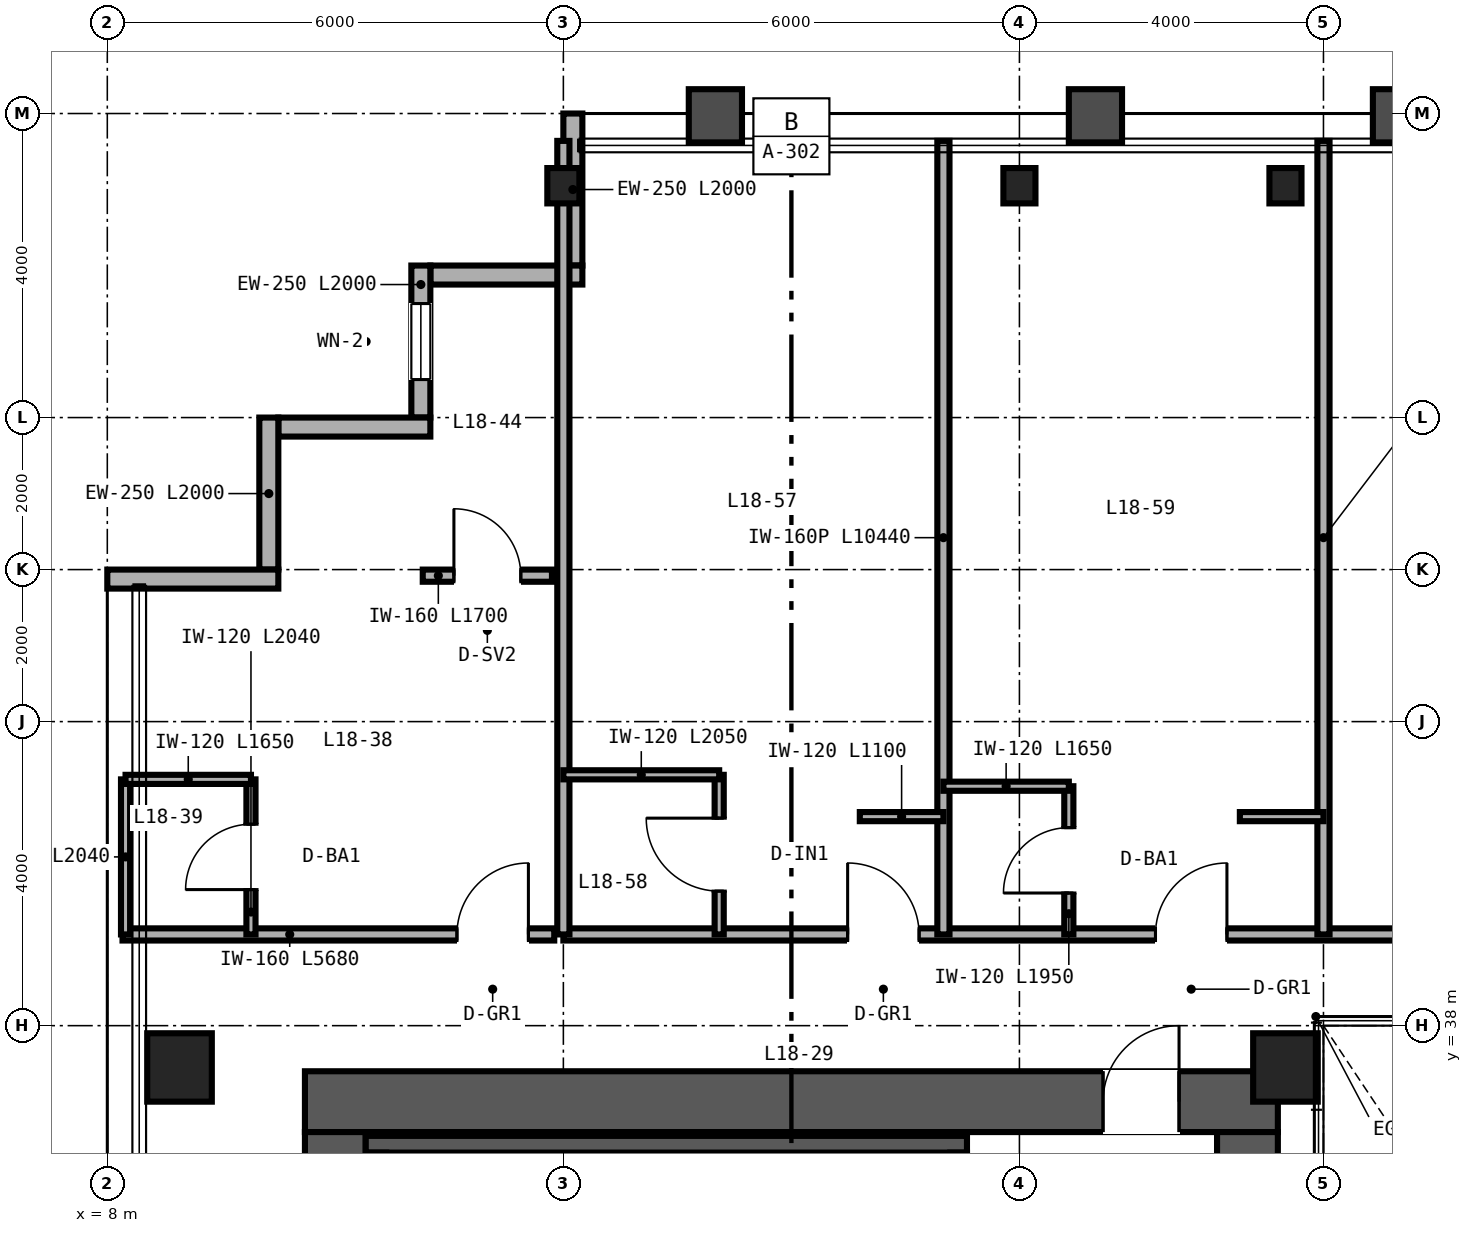
"""IFC4 building model, lengths in metres.
Left out: names, types, materials, properties, quantities, classifications, styles, units other than length and angle.
Written with IfcOpenShell. Run it as: python <this file> out.ifc"""

import sys

from ifc_helpers import new_model, si_unit, direction, frame, frame_2d, origin, origin_2d, place, context, subcontext, project, spatial, rectangle, hollow_rectangle, i_section, extrude, source, transform, mapped, element, fill, save


model = new_model("IFC4")
c1 = context("Model", 3, precision=1e-05, world=origin(), true_north=direction((0.0, 1.0)))
c2 = subcontext(c1, "Body", "Model", "MODEL_VIEW")
j1 = project(units=[si_unit("LENGTHUNIT", "METRE"), si_unit("PLANEANGLEUNIT", "RADIAN")], contexts=[c1])
p1 = place(None, origin())
s1 = spatial("IfcSite", under=j1, at=p1, CompositionType="ELEMENT")
p2 = place(p1, origin())
s2 = spatial("IfcBuilding", under=s1, at=p2, CompositionType="ELEMENT")
p3 = place(p2, frame((0.0, 0.0, 74.4)))
s3 = spatial("IfcBuildingStorey", under=s2, at=p3, CompositionType="ELEMENT", Elevation=74.4)
p4 = place(p3, frame((10.6, 37.0, 0.0), z_axis=(0.0, 0.0, 1.0), x_axis=(1.0, 0.0, 0.0)))
e1 = element("IfcWall", 1, at=p4, inside=s3, PredefinedType="SHEAR", context=c2, shape_type="SweptSolid", body=[
    extrude(rectangle(XDim=12.8, YDim=0.8, at=frame_2d((6.4, 0.0))), origin(), (0.0, 0.0, 1.0), 3.35),
])
p5 = place(p4, frame((10.5, 0.0, 0.0)))
e2 = element("IfcOpeningElement", 2, at=p5, cuts=e1, PredefinedType="OPENING", context=c2, shape_type="SweptSolid", body=[
    extrude(rectangle(XDim=1.0, YDim=2.15, at=frame_2d((0.5, 1.075))), frame((0.0, 0.41, 0.0), z_axis=(0.0, -1.0, 0.0), x_axis=(1.0, 0.0, 0.0)), (0.0, 0.0, 1.0), 0.82),
])
for number, where, z_axis, x_axis in (
    (3, (11.0, 15.4, 0.0), (0.0, 0.0, 1.0), (0.0, 1.0, 0.0)),
    (4, (23.0, 15.4, 0.0), (0.0, 0.0, 1.0), (0.0, 1.0, 0.0)),
):
    element("IfcWall", number, at=place(p3, frame(where, z_axis=z_axis, x_axis=x_axis)), inside=s3, PredefinedType="SHEAR", context=c2, shape_type="SweptSolid", body=[
        extrude(rectangle(XDim=21.2, YDim=0.8, at=frame_2d((10.6, 0.0))), origin(), (0.0, 0.0, 1.0), 3.35),
    ])
p6 = place(p3, frame((11.4, 36.44, 0.0), z_axis=(0.0, 0.0, 1.0), x_axis=(1.0, 0.0, 0.0)))
e5 = element("IfcWall", 5, at=p6, inside=s3, PredefinedType="SHEAR", context=c2, shape_type="SweptSolid", body=[
    extrude(rectangle(XDim=7.91, YDim=0.22, at=frame_2d((3.955, 0.0))), origin(), (0.0, 0.0, 1.0), 3.4),
])
for number, where, z_axis, x_axis in (
    (6, (11.56, 33.05, 0.0), (0.0, 0.0, 1.0), (0.0, 1.0, 0.0)),
    (7, (19.2, 33.05, 0.0), (0.0, 0.0, 1.0), (0.0, 1.0, 0.0)),
):
    element("IfcWall", number, at=place(p3, frame(where, z_axis=z_axis, x_axis=x_axis)), inside=s3, PredefinedType="SHEAR", context=c2, shape_type="SweptSolid", body=[
        extrude(rectangle(XDim=3.28, YDim=0.22, at=frame_2d((1.64, 0.0))), origin(), (0.0, 0.0, 1.0), 3.4),
    ])
m1 = source(origin(), c2, "Body", "SweptSolid", [
    extrude(hollow_rectangle(XDim=0.85, YDim=0.9, WallThickness=0.04, at=origin_2d()), origin(), (0.0, 0.0, 1.0), 3.35),
])
for number, where, z_axis, x_axis in (
    (8, (8.95, 37.45, 0.0), (0.0, 0.0, 1.0), (1.0, 0.0, 0.0)),
    (9, (23.5, 37.45, 0.0), (0.0, 0.0, 1.0), (1.0, 0.0, 0.0)),
):
    element("IfcColumn", number, at=place(p3, frame(where, z_axis=z_axis, x_axis=x_axis)), inside=s3, PredefinedType="COLUMN", context=c2, shape_type="MappedRepresentation", body=[
        mapped(m1, transform((0.0, 0.0, 0.0), scale=1.0)),
    ])
m2 = source(origin(), c2, "Body", "SweptSolid", [
    extrude(i_section(OverallWidth=0.422, OverallDepth=0.465, WebThickness=0.045, FlangeThickness=0.073, FilletRadius=0.025, at=origin_2d()), origin(), (0.0, 0.0, 1.0), 3.35),
])
for number, where, z_axis, x_axis in (
    (10, (14.0, 49.05, 0.0), (0.0, 0.0, 1.0), (1.0, 0.0, 0.0)),
    (11, (20.0, 49.05, 0.0), (0.0, 0.0, 1.0), (1.0, 0.0, 0.0)),
    (12, (23.5, 49.05, 0.0), (0.0, 0.0, 1.0), (1.0, 0.0, 0.0)),
):
    element("IfcColumn", number, at=place(p3, frame(where, z_axis=z_axis, x_axis=x_axis)), inside=s3, PredefinedType="COLUMN", context=c2, shape_type="MappedRepresentation", body=[
        mapped(m2, transform((0.0, 0.0, 0.0), scale=1.0)),
    ])
p7 = place(p3, frame((14.125, 50.0, 0.0), z_axis=(0.0, 0.0, 1.0), x_axis=(0.0, -1.0, 0.0)))
e13 = element("IfcWall", 13, at=p7, inside=s3, PredefinedType="SOLIDWALL", context=c2, shape_type="SweptSolid", body=[
    extrude(rectangle(XDim=2.0, YDim=0.25, at=frame_2d((1.0, 0.0))), origin(), (0.0, 0.0, 1.0), 2.657),
])
p8 = place(p3, frame((14.25, 47.875, 0.0), z_axis=(0.0, 0.0, 1.0), x_axis=(-1.0, 0.0, 0.0)))
e14 = element("IfcWall", 14, at=p8, inside=s3, PredefinedType="SOLIDWALL", context=c2, shape_type="SweptSolid", body=[
    extrude(rectangle(XDim=2.0, YDim=0.25, at=frame_2d((1.0, 0.0))), origin(), (0.0, 0.0, 1.0), 3.35),
])
p9 = place(p3, frame((12.125, 48.0, 0.0), z_axis=(0.0, 0.0, 1.0), x_axis=(0.0, -1.0, 0.0)))
e15 = element("IfcWall", 15, at=p9, inside=s3, PredefinedType="SOLIDWALL", context=c2, shape_type="SweptSolid", body=[
    extrude(rectangle(XDim=2.0, YDim=0.25, at=frame_2d((1.0, 0.0))), origin(), (0.0, 0.0, 1.0), 3.35),
])
p10 = place(p9, frame((0.5, 0.0, 0.85)))
e16 = element("IfcOpeningElement", 16, at=p10, cuts=e15, PredefinedType="OPENING", context=c2, shape_type="SweptSolid", body=[
    extrude(rectangle(XDim=1.0, YDim=1.9, at=frame_2d((0.5, 0.95))), frame((0.0, 0.135, 0.0), z_axis=(0.0, -1.0, 0.0), x_axis=(1.0, 0.0, 0.0)), (0.0, 0.0, 1.0), 0.27),
])
for number, where, z_axis, x_axis in (
    (17, (12.25, 45.875, 0.0), (0.0, 0.0, 1.0), (-1.0, 0.0, 0.0)),
    (18, (10.125, 46.0, 0.0), (0.0, 0.0, 1.0), (0.0, -1.0, 0.0)),
):
    element("IfcWall", number, at=place(p3, frame(where, z_axis=z_axis, x_axis=x_axis)), inside=s3, PredefinedType="SOLIDWALL", context=c2, shape_type="SweptSolid", body=[
        extrude(rectangle(XDim=2.0, YDim=0.25, at=frame_2d((1.0, 0.0))), origin(), (0.0, 0.0, 1.0), 3.35),
    ])
p11 = place(p3, frame((10.25, 43.875, 0.0), z_axis=(0.0, 0.0, 1.0), x_axis=(-1.0, 0.0, 0.0)))
e19 = element("IfcWall", 19, at=p11, inside=s3, PredefinedType="SOLIDWALL", context=c2, shape_type="SweptSolid", body=[
    extrude(rectangle(XDim=2.25, YDim=0.25, at=frame_2d((1.125, 0.0))), origin(), (0.0, 0.0, 1.0), 3.35),
])
p12 = place(p3, frame((8.2, 39.2, 0.0), z_axis=(0.0, 0.0, 1.0), x_axis=(1.0, 0.0, 0.0)))
e20 = element("IfcWall", 20, at=p12, inside=s3, PredefinedType="PARTITIONING", context=c2, shape_type="SweptSolid", body=[
    extrude(rectangle(XDim=5.68, YDim=0.16, at=frame_2d((2.84, 0.0))), origin(), (0.0, 0.0, 1.0), 3.35),
])
p13 = place(p12, frame((4.4, 0.0, 0.0)))
e21 = element("IfcOpeningElement", 21, at=p13, cuts=e20, PredefinedType="OPENING", context=c2, shape_type="SweptSolid", body=[
    extrude(rectangle(XDim=0.94, YDim=2.15, at=frame_2d((0.47, 1.075))), frame((0.0, 0.09, 0.0), z_axis=(0.0, -1.0, 0.0), x_axis=(1.0, 0.0, 0.0)), (0.0, 0.0, 1.0), 0.18),
])
p14 = place(p3, frame((9.89, 39.2, 0.0), z_axis=(0.0, 0.0, 1.0), x_axis=(0.0, 1.0, 0.0)))
e22 = element("IfcWall", 22, at=p14, inside=s3, PredefinedType="PARTITIONING", context=c2, shape_type="SweptSolid", body=[
    extrude(rectangle(XDim=2.04, YDim=0.12, at=frame_2d((1.02, 0.0))), origin(), (0.0, 0.0, 1.0), 3.35),
])
p15 = place(p14, frame((0.59, 0.0, 0.0)))
e23 = element("IfcOpeningElement", 23, at=p15, cuts=e22, PredefinedType="OPENING", context=c2, shape_type="SweptSolid", body=[
    extrude(rectangle(XDim=0.86, YDim=2.1, at=frame_2d((0.43, 1.05))), frame((0.0, 0.07, 0.0), z_axis=(0.0, -1.0, 0.0), x_axis=(1.0, 0.0, 0.0)), (0.0, 0.0, 1.0), 0.14),
])
p16 = place(p3, frame((8.24, 39.2, 0.0), z_axis=(0.0, 0.0, 1.0), x_axis=(0.0, 1.0, 0.0)))
e24 = element("IfcWall", 24, at=p16, inside=s3, PredefinedType="PARTITIONING", context=c2, shape_type="SweptSolid", body=[
    extrude(rectangle(XDim=2.04, YDim=0.12, at=frame_2d((1.02, 0.0))), origin(), (0.0, 0.0, 1.0), 3.35),
])
p17 = place(p3, frame((8.24, 41.24, 0.0), z_axis=(0.0, 0.0, 1.0), x_axis=(1.0, 0.0, 0.0)))
e25 = element("IfcWall", 25, at=p17, inside=s3, PredefinedType="PARTITIONING", context=c2, shape_type="SweptSolid", body=[
    extrude(rectangle(XDim=1.65, YDim=0.12, at=frame_2d((0.825, 0.0))), origin(), (0.0, 0.0, 1.0), 3.35),
])
p18 = place(p3, frame((12.15, 43.92, 0.0), z_axis=(0.0, 0.0, 1.0), x_axis=(1.0, 0.0, 0.0)))
e26 = element("IfcWall", 26, at=p18, inside=s3, PredefinedType="PARTITIONING", context=c2, shape_type="SweptSolid", body=[
    extrude(rectangle(XDim=1.7, YDim=0.16, at=frame_2d((0.85, 0.0))), origin(), (0.0, 0.0, 1.0), 3.35),
])
p19 = place(p18, frame((0.41, 0.0, 0.0)))
e27 = element("IfcOpeningElement", 27, at=p19, cuts=e26, PredefinedType="OPENING", context=c2, shape_type="SweptSolid", body=[
    extrude(rectangle(XDim=0.88, YDim=2.15, at=frame_2d((0.44, 1.075))), frame((0.0, 0.09, 0.0), z_axis=(0.0, -1.0, 0.0), x_axis=(1.0, 0.0, 0.0)), (0.0, 0.0, 1.0), 0.18),
])
p20 = place(p3, frame((14.0, 39.2, 0.0), z_axis=(0.0, 0.0, 1.0), x_axis=(1.0, 0.0, 0.0)))
e28 = element("IfcWall", 28, at=p20, inside=s3, PredefinedType="PARTITIONING", context=c2, shape_type="SweptSolid", body=[
    extrude(rectangle(XDim=36.0, YDim=0.16, at=frame_2d((18.0, 0.0))), origin(), (0.0, 0.0, 1.0), 2.571),
])
p21 = place(p20, frame((3.74, 0.0, 0.0)))
e29 = element("IfcOpeningElement", 29, at=p21, cuts=e28, PredefinedType="OPENING", context=c2, shape_type="SweptSolid", body=[
    extrude(rectangle(XDim=0.94, YDim=2.15, at=frame_2d((0.47, 1.075))), frame((0.0, 0.09, 0.0), z_axis=(0.0, -1.0, 0.0), x_axis=(1.0, 0.0, 0.0)), (0.0, 0.0, 1.0), 0.18),
])
p22 = place(p20, frame((7.79, 0.0, 0.0)))
e30 = element("IfcOpeningElement", 30, at=p22, cuts=e28, PredefinedType="OPENING", context=c2, shape_type="SweptSolid", body=[
    extrude(rectangle(XDim=0.94, YDim=2.15, at=frame_2d((0.47, 1.075))), frame((0.0, 0.09, 0.0), z_axis=(0.0, -1.0, 0.0), x_axis=(1.0, 0.0, 0.0)), (0.0, 0.0, 1.0), 0.18),
])
p23 = place(p20, frame((12.22, 0.0, 0.0)))
e31 = element("IfcOpeningElement", 31, at=p23, cuts=e28, PredefinedType="OPENING", context=c2, shape_type="SweptSolid", body=[
    extrude(rectangle(XDim=0.96, YDim=2.15, at=frame_2d((0.48, 1.075))), frame((0.0, 0.09, 0.0), z_axis=(0.0, -1.0, 0.0), x_axis=(1.0, 0.0, 0.0)), (0.0, 0.0, 1.0), 0.18),
])
p24 = place(p20, frame((19.94, 0.0, 0.0)))
e32 = element("IfcOpeningElement", 32, at=p24, cuts=e28, PredefinedType="OPENING", context=c2, shape_type="SweptSolid", body=[
    extrude(rectangle(XDim=0.94, YDim=2.15, at=frame_2d((0.47, 1.075))), frame((0.0, 0.09, 0.0), z_axis=(0.0, -1.0, 0.0), x_axis=(1.0, 0.0, 0.0)), (0.0, 0.0, 1.0), 0.18),
])
p25 = place(p20, frame((24.84, 0.0, 0.0)))
e33 = element("IfcOpeningElement", 33, at=p25, cuts=e28, PredefinedType="OPENING", context=c2, shape_type="SweptSolid", body=[
    extrude(rectangle(XDim=0.94, YDim=2.15, at=frame_2d((0.47, 1.075))), frame((0.0, 0.09, 0.0), z_axis=(0.0, -1.0, 0.0), x_axis=(1.0, 0.0, 0.0)), (0.0, 0.0, 1.0), 0.18),
])
p26 = place(p20, frame((29.94, 0.0, 0.0)))
e34 = element("IfcOpeningElement", 34, at=p26, cuts=e28, PredefinedType="OPENING", context=c2, shape_type="SweptSolid", body=[
    extrude(rectangle(XDim=0.94, YDim=2.15, at=frame_2d((0.47, 1.075))), frame((0.0, 0.09, 0.0), z_axis=(0.0, -1.0, 0.0), x_axis=(1.0, 0.0, 0.0)), (0.0, 0.0, 1.0), 0.18),
])
p27 = place(p20, frame((33.12, 0.0, 0.0)))
e35 = element("IfcOpeningElement", 35, at=p27, cuts=e28, PredefinedType="OPENING", context=c2, shape_type="SweptSolid", body=[
    extrude(rectangle(XDim=0.96, YDim=2.15, at=frame_2d((0.48, 1.075))), frame((0.0, 0.09, 0.0), z_axis=(0.0, -1.0, 0.0), x_axis=(1.0, 0.0, 0.0)), (0.0, 0.0, 1.0), 0.18),
])
for number, where, z_axis, x_axis in (
    (36, (14.0, 39.2, 0.0), (0.0, 0.0, 1.0), (0.0, 1.0, 0.0)),
    (37, (19.0, 39.2, 0.0), (0.0, 0.0, 1.0), (0.0, 1.0, 0.0)),
):
    element("IfcWall", number, at=place(p3, frame(where, z_axis=z_axis, x_axis=x_axis)), inside=s3, PredefinedType="PARTITIONING", context=c2, shape_type="SweptSolid", body=[
        extrude(rectangle(XDim=10.44, YDim=0.16, at=frame_2d((5.22, 0.0))), origin(), (0.0, 0.0, 1.0), 2.657),
    ])
p28 = place(p3, frame((16.05, 39.2, 0.0), z_axis=(0.0, 0.0, 1.0), x_axis=(0.0, 1.0, 0.0)))
e38 = element("IfcWall", 38, at=p28, inside=s3, PredefinedType="PARTITIONING", context=c2, shape_type="SweptSolid", body=[
    extrude(rectangle(XDim=2.1, YDim=0.12, at=frame_2d((1.05, 0.0))), origin(), (0.0, 0.0, 1.0), 3.35),
])
p29 = place(p28, frame((0.57, 0.0, 0.0)))
e39 = element("IfcOpeningElement", 39, at=p29, cuts=e38, PredefinedType="OPENING", context=c2, shape_type="SweptSolid", body=[
    extrude(rectangle(XDim=0.96, YDim=2.15, at=frame_2d((0.48, 1.075))), frame((0.0, 0.07, 0.0), z_axis=(0.0, -1.0, 0.0), x_axis=(1.0, 0.0, 0.0)), (0.0, 0.0, 1.0), 0.14),
])
p30 = place(p3, frame((14.0, 41.3, 0.0), z_axis=(0.0, 0.0, 1.0), x_axis=(1.0, 0.0, 0.0)))
e40 = element("IfcWall", 40, at=p30, inside=s3, PredefinedType="PARTITIONING", context=c2, shape_type="SweptSolid", body=[
    extrude(rectangle(XDim=2.05, YDim=0.12, at=frame_2d((1.025, 0.0))), origin(), (0.0, 0.0, 1.0), 3.35),
])
p31 = place(p3, frame((17.9, 40.75, 0.0), z_axis=(0.0, 0.0, 1.0), x_axis=(1.0, 0.0, 0.0)))
e41 = element("IfcWall", 41, at=p31, inside=s3, PredefinedType="PARTITIONING", context=c2, shape_type="SweptSolid", body=[
    extrude(rectangle(XDim=1.1, YDim=0.12, at=frame_2d((0.55, 0.0))), origin(), (0.0, 0.0, 1.0), 3.35),
])
p32 = place(p3, frame((24.0, 39.2, 0.0), z_axis=(0.0, 0.0, 1.0), x_axis=(0.0, 1.0, 0.0)))
e42 = element("IfcWall", 42, at=p32, inside=s3, PredefinedType="PARTITIONING", context=c2, shape_type="SweptSolid", body=[
    extrude(rectangle(XDim=10.44, YDim=0.16, at=frame_2d((5.22, 0.0))), origin(), (0.0, 0.0, 1.0), 2.423),
])
p33 = place(p3, frame((20.65, 39.2, 0.0), z_axis=(0.0, 0.0, 1.0), x_axis=(0.0, 1.0, 0.0)))
e43 = element("IfcWall", 43, at=p33, inside=s3, PredefinedType="PARTITIONING", context=c2, shape_type="SweptSolid", body=[
    extrude(rectangle(XDim=1.95, YDim=0.12, at=frame_2d((0.975, 0.0))), origin(), (0.0, 0.0, 1.0), 3.35),
])
p34 = place(p33, frame((0.545, 0.0, 0.0)))
e44 = element("IfcOpeningElement", 44, at=p34, cuts=e43, PredefinedType="OPENING", context=c2, shape_type="SweptSolid", body=[
    extrude(rectangle(XDim=0.86, YDim=2.1, at=frame_2d((0.43, 1.05))), frame((0.0, 0.07, 0.0), z_axis=(0.0, -1.0, 0.0), x_axis=(1.0, 0.0, 0.0)), (0.0, 0.0, 1.0), 0.14),
])
p35 = place(p3, frame((19.0, 41.15, 0.0), z_axis=(0.0, 0.0, 1.0), x_axis=(1.0, 0.0, 0.0)))
e45 = element("IfcWall", 45, at=p35, inside=s3, PredefinedType="PARTITIONING", context=c2, shape_type="SweptSolid", body=[
    extrude(rectangle(XDim=1.65, YDim=0.12, at=frame_2d((0.825, 0.0))), origin(), (0.0, 0.0, 1.0), 3.35),
])
p36 = place(p3, frame((22.9, 40.75, 0.0), z_axis=(0.0, 0.0, 1.0), x_axis=(1.0, 0.0, 0.0)))
e46 = element("IfcWall", 46, at=p36, inside=s3, PredefinedType="PARTITIONING", context=c2, shape_type="SweptSolid", body=[
    extrude(rectangle(XDim=1.1, YDim=0.12, at=frame_2d((0.55, 0.0))), origin(), (0.0, 0.0, 1.0), 2.571),
])
m3 = source(origin(), c2, "Body", "SweptSolid", [
    extrude(rectangle(XDim=1.0, YDim=1.9, at=frame_2d((0.5, 0.95))), frame((0.0, 0.03, 0.0), z_axis=(0.0, -1.0, 0.0), x_axis=(1.0, 0.0, 0.0)), (0.0, 0.0, 1.0), 0.06),
])
p37 = place(p10, origin())
e47 = element("IfcWindow", 47, at=p37, inside=s3, PartitioningType="SINGLE_PANEL", PredefinedType="WINDOW", context=c2, shape_type="MappedRepresentation", body=[
    mapped(m3, transform((0.0, 0.0, 0.0), scale=1.0)),
])
fill(e16, e47)
m4 = source(origin(), c2, "Body", "SweptSolid", [
    extrude(rectangle(XDim=1.0, YDim=2.15, at=frame_2d((0.5, 1.075))), frame((0.0, 0.025, 0.0), z_axis=(0.0, -1.0, 0.0), x_axis=(1.0, 0.0, 0.0)), (0.0, 0.0, 1.0), 0.05),
])
p38 = place(p5, origin())
e48 = element("IfcDoor", 48, at=p38, inside=s3, OperationType="SINGLE_SWING_RIGHT", PredefinedType="DOOR", context=c2, shape_type="MappedRepresentation", body=[
    mapped(m4, transform((0.0, 0.0, 0.0), scale=1.0)),
])
fill(e2, e48)
m5 = source(origin(), c2, "Body", "SweptSolid", [
    extrude(rectangle(XDim=0.86, YDim=2.1, at=frame_2d((0.43, 1.05))), frame((0.0, 0.025, 0.0), z_axis=(0.0, -1.0, 0.0), x_axis=(1.0, 0.0, 0.0)), (0.0, 0.0, 1.0), 0.05),
])
p39 = place(p15, origin())
e49 = element("IfcDoor", 49, at=p39, inside=s3, OperationType="SINGLE_SWING_LEFT", PredefinedType="DOOR", context=c2, shape_type="MappedRepresentation", body=[
    mapped(m5, transform((0.0, 0.0, 0.0), scale=1.0)),
])
fill(e23, e49)
m6 = source(origin(), c2, "Body", "SweptSolid", [
    extrude(rectangle(XDim=0.94, YDim=2.15, at=frame_2d((0.47, 1.075))), frame((0.0, 0.025, 0.0), z_axis=(0.0, -1.0, 0.0), x_axis=(1.0, 0.0, 0.0)), (0.0, 0.0, 1.0), 0.05),
])
p40 = place(p13, origin())
e50 = element("IfcDoor", 50, at=p40, inside=s3, OperationType="SINGLE_SWING_RIGHT", PredefinedType="DOOR", context=c2, shape_type="MappedRepresentation", body=[
    mapped(m6, transform((0.0, 0.0, 0.0), scale=1.0)),
])
fill(e21, e50)
m7 = source(origin(), c2, "Body", "SweptSolid", [
    extrude(rectangle(XDim=0.88, YDim=2.15, at=frame_2d((0.44, 1.075))), frame((0.0, 0.025, 0.0), z_axis=(0.0, -1.0, 0.0), x_axis=(1.0, 0.0, 0.0)), (0.0, 0.0, 1.0), 0.05),
])
p41 = place(p19, origin())
e51 = element("IfcDoor", 51, at=p41, inside=s3, OperationType="SINGLE_SWING_LEFT", PredefinedType="DOOR", context=c2, shape_type="MappedRepresentation", body=[
    mapped(m7, transform((0.0, 0.0, 0.0), scale=1.0)),
])
fill(e27, e51)
m8 = source(origin(), c2, "Body", "SweptSolid", [
    extrude(rectangle(XDim=0.96, YDim=2.15, at=frame_2d((0.48, 1.075))), frame((0.0, 0.025, 0.0), z_axis=(0.0, -1.0, 0.0), x_axis=(1.0, 0.0, 0.0)), (0.0, 0.0, 1.0), 0.05),
])
p42 = place(p29, origin())
e52 = element("IfcDoor", 52, at=p42, inside=s3, OperationType="SINGLE_SWING_RIGHT", PredefinedType="DOOR", context=c2, shape_type="MappedRepresentation", body=[
    mapped(m8, transform((0.0, 0.0, 0.0), scale=1.0)),
])
fill(e39, e52)
p43 = place(p34, origin())
e53 = element("IfcDoor", 53, at=p43, inside=s3, OperationType="SINGLE_SWING_LEFT", PredefinedType="DOOR", context=c2, shape_type="MappedRepresentation", body=[
    mapped(m5, transform((0.0, 0.0, 0.0), scale=1.0)),
])
fill(e44, e53)
p44 = place(p21, origin())
e54 = element("IfcDoor", 54, at=p44, inside=s3, OperationType="SINGLE_SWING_LEFT", PredefinedType="DOOR", context=c2, shape_type="MappedRepresentation", body=[
    mapped(m6, transform((0.0, 0.0, 0.0), scale=1.0)),
])
fill(e29, e54)
p45 = place(p22, origin())
e55 = element("IfcDoor", 55, at=p45, inside=s3, OperationType="SINGLE_SWING_RIGHT", PredefinedType="DOOR", context=c2, shape_type="MappedRepresentation", body=[
    mapped(m6, transform((0.0, 0.0, 0.0), scale=1.0)),
])
fill(e30, e55)
save(model, sys.argv[1])
